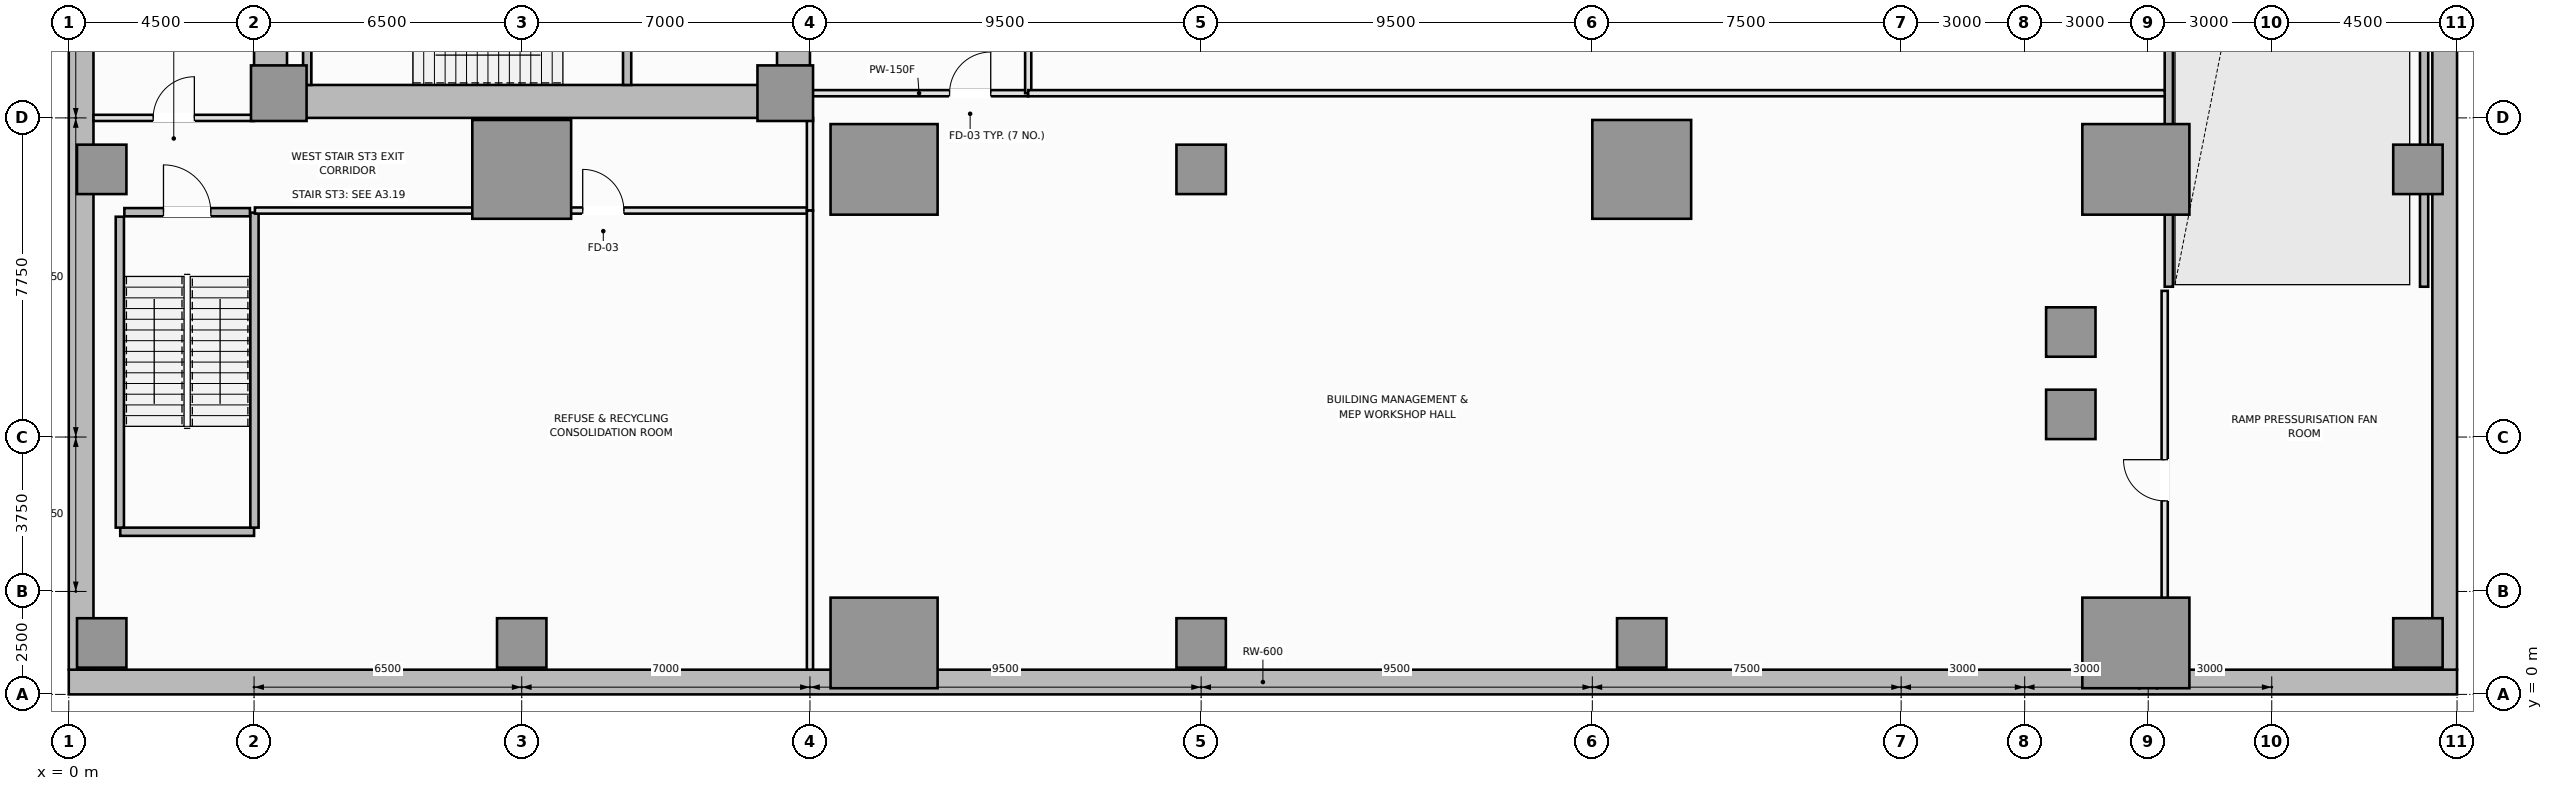
"""IFC4 building model, lengths in metres.
Left out: names, types, materials, properties, quantities, classifications, styles, units other than length and angle.
Written with IfcOpenShell. Run it as: python <this file> out.ifc"""

import sys

from ifc_helpers import new_model, si_unit, direction, frame, frame_2d, origin, origin_2d, place, context, subcontext, project, spatial, rectangle, extrude, element, fill, save


model = new_model("IFC4")
c1 = context("Model", 3, precision=1e-05, world=origin(), true_north=direction((0.0, 1.0)))
c2 = subcontext(c1, "Body", "Model", "MODEL_VIEW")
j1 = project(units=[si_unit("LENGTHUNIT", "METRE"), si_unit("PLANEANGLEUNIT", "RADIAN")], contexts=[c1])
p1 = place(None, origin())
s1 = spatial("IfcSite", under=j1, at=p1, CompositionType="ELEMENT")
p2 = place(p1, origin())
s2 = spatial("IfcBuilding", under=s1, at=p2, CompositionType="ELEMENT")
p3 = place(p2, frame((0.0, 0.0, -4.8)))
s3 = spatial("IfcBuildingStorey", under=s2, at=p3, CompositionType="ELEMENT", Elevation=-4.8)
p4 = place(p3, frame((0.0, 0.3, 0.0), z_axis=(0.0, 0.0, 1.0), x_axis=(1.0, 0.0, 0.0)))
e1 = element("IfcWall", 1, at=p4, inside=s3, PredefinedType="USERDEFINED", context=c2, shape_type="SweptSolid", body=[
    extrude(rectangle(XDim=58.0, YDim=0.6, at=frame_2d((29.0, 0.0))), origin(), (0.0, 0.0, 1.0), 4.8),
])
for number, where, z_axis, x_axis in (
    (2, (0.3, 0.6, 0.0), (0.0, 0.0, 1.0), (0.0, 1.0, 0.0)),
    (3, (57.7, 0.6, 0.0), (0.0, 0.0, 1.0), (0.0, 1.0, 0.0)),
):
    element("IfcWall", number, at=place(p3, frame(where, z_axis=z_axis, x_axis=x_axis)), inside=s3, PredefinedType="USERDEFINED", context=c2, shape_type="SweptSolid", body=[
        extrude(rectangle(XDim=49.3, YDim=0.6, at=frame_2d((24.65, 0.0))), origin(), (0.0, 0.0, 1.0), 4.8),
    ])
p5 = place(p3, frame((4.5, 14.4, 0.0), z_axis=(0.0, 0.0, 1.0), x_axis=(1.0, 0.0, 0.0)))
e4 = element("IfcWall", 4, at=p5, inside=s3, PredefinedType="SHEAR", context=c2, shape_type="SweptSolid", body=[
    extrude(rectangle(XDim=13.5, YDim=0.8, at=frame_2d((6.75, 0.0))), origin(), (0.0, 0.0, 1.0), 4.8),
])
p6 = place(p3, frame((4.9, 14.8, 0.0), z_axis=(0.0, 0.0, 1.0), x_axis=(0.0, 1.0, 0.0)))
e5 = element("IfcWall", 5, at=p6, inside=s3, PredefinedType="SHEAR", context=c2, shape_type="SweptSolid", body=[
    extrude(rectangle(XDim=20.9, YDim=0.8, at=frame_2d((10.45, 0.0))), origin(), (0.0, 0.0, 1.0), 4.8),
])
p7 = place(p3, frame((17.6, 14.8, 0.0), z_axis=(0.0, 0.0, 1.0), x_axis=(0.0, 1.0, 0.0)))
e6 = element("IfcWall", 6, at=p7, inside=s3, PredefinedType="SHEAR", context=c2, shape_type="SweptSolid", body=[
    extrude(rectangle(XDim=8.65, YDim=0.8, at=frame_2d((4.325, 0.0))), origin(), (0.0, 0.0, 1.0), 4.8),
])
p8 = place(p7, frame((4.1, 0.0, 0.0)))
e7 = element("IfcOpeningElement", 7, at=p8, cuts=e6, PredefinedType="OPENING", context=c2, shape_type="SweptSolid", body=[
    extrude(rectangle(XDim=1.1, YDim=2.15, at=frame_2d((0.55, 1.075))), frame((0.0, 0.41, 0.0), z_axis=(0.0, -1.0, 0.0), x_axis=(1.0, 0.0, 0.0)), (0.0, 0.0, 1.0), 0.82),
])
for number, where, z_axis, x_axis in (
    (8, (5.1, 14.6, 0.0), (0.0, 0.0, 1.0), (1.0, 0.0, 0.0)),
    (9, (17.4, 14.6, 0.0), (0.0, 0.0, 1.0), (1.0, 0.0, 0.0)),
):
    element("IfcColumn", number, at=place(p3, frame(where, z_axis=z_axis, x_axis=x_axis)), inside=s3, PredefinedType="PILASTER", context=c2, shape_type="SweptSolid", body=[
        extrude(rectangle(XDim=1.35, YDim=1.35, at=origin_2d()), origin(), (0.0, 0.0, 1.0), 4.8),
    ])
for number, where, z_axis, x_axis in (
    (10, (11.0, 12.75, 0.0), (0.0, 0.0, 1.0), (1.0, 0.0, 0.0)),
    (11, (38.2, 12.75, 0.0), (0.0, 0.0, 1.0), (1.0, 0.0, 0.0)),
):
    element("IfcColumn", number, at=place(p3, frame(where, z_axis=z_axis, x_axis=x_axis)), inside=s3, PredefinedType="COLUMN", context=c2, shape_type="SweptSolid", body=[
        extrude(rectangle(XDim=2.4, YDim=2.4, at=origin_2d()), origin(), (0.0, 0.0, 1.0), 4.8),
    ])
p9 = place(p3, frame((27.5, 12.75, 0.0), z_axis=(0.0, 0.0, 1.0), x_axis=(1.0, 0.0, 0.0)))
e12 = element("IfcColumn", 12, at=p9, inside=s3, PredefinedType="COLUMN", context=c2, shape_type="SweptSolid", body=[
    extrude(rectangle(XDim=1.2, YDim=1.2, at=origin_2d()), origin(), (0.0, 0.0, 1.0), 4.8),
])
for number, where, z_axis, x_axis in (
    (13, (19.8, 1.25, 0.0), (0.0, 0.0, 1.0), (1.0, 0.0, 0.0)),
    (14, (50.2, 1.25, 0.0), (0.0, 0.0, 1.0), (1.0, 0.0, 0.0)),
    (15, (19.8, 12.75, 0.0), (0.0, 0.0, 1.0), (1.0, 0.0, 0.0)),
    (16, (50.2, 12.75, 0.0), (0.0, 0.0, 1.0), (1.0, 0.0, 0.0)),
):
    element("IfcColumn", number, at=place(p3, frame(where, z_axis=z_axis, x_axis=x_axis)), inside=s3, PredefinedType="COLUMN", context=c2, shape_type="SweptSolid", body=[
        extrude(rectangle(XDim=2.6, YDim=2.2, at=origin_2d()), origin(), (0.0, 0.0, 1.0), 4.8),
    ])
for number, where, z_axis, x_axis in (
    (17, (0.8, 1.25, 0.0), (0.0, 0.0, 1.0), (1.0, 0.0, 0.0)),
    (18, (57.05, 1.25, 0.0), (0.0, 0.0, 1.0), (1.0, 0.0, 0.0)),
    (19, (0.8, 12.75, 0.0), (0.0, 0.0, 1.0), (1.0, 0.0, 0.0)),
    (20, (57.05, 12.75, 0.0), (0.0, 0.0, 1.0), (1.0, 0.0, 0.0)),
    (21, (11.0, 1.25, 0.0), (0.0, 0.0, 1.0), (1.0, 0.0, 0.0)),
    (22, (48.62, 6.8, 0.0), (0.0, 0.0, 1.0), (1.0, 0.0, 0.0)),
    (23, (48.62, 8.8, 0.0), (0.0, 0.0, 1.0), (1.0, 0.0, 0.0)),
    (24, (27.5, 1.25, 0.0), (0.0, 0.0, 1.0), (1.0, 0.0, 0.0)),
    (25, (38.2, 1.25, 0.0), (0.0, 0.0, 1.0), (1.0, 0.0, 0.0)),
):
    element("IfcColumn", number, at=place(p3, frame(where, z_axis=z_axis, x_axis=x_axis)), inside=s3, PredefinedType="COLUMN", context=c2, shape_type="SweptSolid", body=[
        extrude(rectangle(XDim=1.2, YDim=1.2, at=origin_2d()), origin(), (0.0, 0.0, 1.0), 4.8),
    ])
p10 = place(p3, frame((5.79, 14.8, 0.0), z_axis=(0.0, 0.0, 1.0), x_axis=(0.0, 1.0, 0.0)))
e26 = element("IfcWall", 26, at=p10, inside=s3, PredefinedType="SOLIDWALL", context=c2, shape_type="SweptSolid", body=[
    extrude(rectangle(XDim=3.05, YDim=0.2, at=frame_2d((1.525, 0.0))), origin(), (0.0, 0.0, 1.0), 4.8),
])
p11 = place(p3, frame((13.56, 14.8, 0.0), z_axis=(0.0, 0.0, 1.0), x_axis=(0.0, 1.0, 0.0)))
e27 = element("IfcWall", 27, at=p11, inside=s3, PredefinedType="SOLIDWALL", context=c2, shape_type="SweptSolid", body=[
    extrude(rectangle(XDim=3.05, YDim=0.2, at=frame_2d((1.525, 0.0))), origin(), (0.0, 0.0, 1.0), 4.8),
])
p12 = place(p11, frame((0.95, 0.0, 0.0)))
e28 = element("IfcOpeningElement", 28, at=p12, cuts=e27, PredefinedType="OPENING", context=c2, shape_type="SweptSolid", body=[
    extrude(rectangle(XDim=1.15, YDim=2.15, at=frame_2d((0.575, 1.075))), frame((0.0, 0.11, 0.0), z_axis=(0.0, -1.0, 0.0), x_axis=(1.0, 0.0, 0.0)), (0.0, 0.0, 1.0), 0.22),
])
p13 = place(p3, frame((1.25, 3.95, 0.0), z_axis=(0.0, 0.0, 1.0), x_axis=(1.0, 0.0, 0.0)))
e29 = element("IfcWall", 29, at=p13, inside=s3, PredefinedType="SOLIDWALL", context=c2, shape_type="SweptSolid", body=[
    extrude(rectangle(XDim=3.25, YDim=0.2, at=frame_2d((1.625, 0.0))), origin(), (0.0, 0.0, 1.0), 4.8),
])
p14 = place(p3, frame((1.24, 4.05, 0.0), z_axis=(0.0, 0.0, 1.0), x_axis=(0.0, 1.0, 0.0)))
e30 = element("IfcWall", 30, at=p14, inside=s3, PredefinedType="SOLIDWALL", context=c2, shape_type="SweptSolid", body=[
    extrude(rectangle(XDim=7.55, YDim=0.2, at=frame_2d((3.775, 0.0))), origin(), (0.0, 0.0, 1.0), 4.8),
])
p15 = place(p3, frame((4.51, 4.05, 0.0), z_axis=(0.0, 0.0, 1.0), x_axis=(0.0, 1.0, 0.0)))
e31 = element("IfcWall", 31, at=p15, inside=s3, PredefinedType="SOLIDWALL", context=c2, shape_type="SweptSolid", body=[
    extrude(rectangle(XDim=7.65, YDim=0.2, at=frame_2d((3.825, 0.0))), origin(), (0.0, 0.0, 1.0), 4.8),
])
p16 = place(p3, frame((1.35, 11.71, 0.0), z_axis=(0.0, 0.0, 1.0), x_axis=(1.0, 0.0, 0.0)))
e32 = element("IfcWall", 32, at=p16, inside=s3, PredefinedType="SOLIDWALL", context=c2, shape_type="SweptSolid", body=[
    extrude(rectangle(XDim=3.05, YDim=0.2, at=frame_2d((1.525, 0.0))), origin(), (0.0, 0.0, 1.0), 4.8),
])
p17 = place(p16, frame((0.95, 0.0, 0.0)))
e33 = element("IfcOpeningElement", 33, at=p17, cuts=e32, PredefinedType="OPENING", context=c2, shape_type="SweptSolid", body=[
    extrude(rectangle(XDim=1.15, YDim=2.15, at=frame_2d((0.575, 1.075))), frame((0.0, 0.11, 0.0), z_axis=(0.0, -1.0, 0.0), x_axis=(1.0, 0.0, 0.0)), (0.0, 0.0, 1.0), 0.22),
])
for number, where, z_axis, x_axis in (
    (34, (51.0, 9.9, 0.0), (0.0, 0.0, 1.0), (0.0, 1.0, 0.0)),
    (35, (57.2, 9.9, 0.0), (0.0, 0.0, 1.0), (0.0, 1.0, 0.0)),
):
    element("IfcWall", number, at=place(p3, frame(where, z_axis=z_axis, x_axis=x_axis)), inside=s3, PredefinedType="SOLIDWALL", context=c2, shape_type="SweptSolid", body=[
        extrude(rectangle(XDim=29.0, YDim=0.2, at=frame_2d((14.5, 0.0))), origin(), (0.0, 0.0, 1.0), 4.8),
    ])
p18 = place(p3, frame((18.0, 14.6, 0.0), z_axis=(0.0, 0.0, 1.0), x_axis=(1.0, 0.0, 0.0)))
e36 = element("IfcWall", 36, at=p18, inside=s3, PredefinedType="PARTITIONING", context=c2, shape_type="SweptSolid", body=[
    extrude(rectangle(XDim=5.3, YDim=0.15, at=frame_2d((2.65, 0.0))), origin(), (0.0, 0.0, 1.0), 4.6),
])
p19 = place(p18, frame((3.39, 0.0, 0.0)))
e37 = element("IfcOpeningElement", 37, at=p19, cuts=e36, PredefinedType="OPENING", context=c2, shape_type="SweptSolid", body=[
    extrude(rectangle(XDim=1.0, YDim=2.15, at=frame_2d((0.5, 1.075))), frame((0.0, 0.085, 0.0), z_axis=(0.0, -1.0, 0.0), x_axis=(1.0, 0.0, 0.0)), (0.0, 0.0, 1.0), 0.17),
])
p20 = place(p3, frame((23.3, 14.6, 0.0), z_axis=(0.0, 0.0, 1.0), x_axis=(0.0, 1.0, 0.0)))
e38 = element("IfcWall", 38, at=p20, inside=s3, PredefinedType="PARTITIONING", context=c2, shape_type="SweptSolid", body=[
    extrude(rectangle(XDim=21.3, YDim=0.15, at=frame_2d((10.65, 0.0))), origin(), (0.0, 0.0, 1.0), 4.6),
])
p21 = place(p20, frame((9.75, 0.0, 0.0)))
e39 = element("IfcOpeningElement", 39, at=p21, cuts=e38, PredefinedType="OPENING", context=c2, shape_type="SweptSolid", body=[
    extrude(rectangle(XDim=1.8, YDim=2.2, at=frame_2d((0.9, 1.1))), frame((0.0, 0.085, 0.0), z_axis=(0.0, -1.0, 0.0), x_axis=(1.0, 0.0, 0.0)), (0.0, 0.0, 1.0), 0.17),
])
p22 = place(p3, frame((4.52, 11.75, 0.0), z_axis=(0.0, 0.0, 1.0), x_axis=(1.0, 0.0, 0.0)))
e40 = element("IfcWall", 40, at=p22, inside=s3, PredefinedType="PARTITIONING", context=c2, shape_type="SweptSolid", body=[
    extrude(rectangle(XDim=13.48, YDim=0.15, at=frame_2d((6.74, 0.0))), origin(), (0.0, 0.0, 1.0), 4.6),
])
p23 = place(p22, frame((7.961, 0.0, 0.0)))
e41 = element("IfcOpeningElement", 41, at=p23, cuts=e40, PredefinedType="OPENING", context=c2, shape_type="SweptSolid", body=[
    extrude(rectangle(XDim=1.0, YDim=2.15, at=frame_2d((0.5, 1.075))), frame((0.0, 0.085, 0.0), z_axis=(0.0, -1.0, 0.0), x_axis=(1.0, 0.0, 0.0)), (0.0, 0.0, 1.0), 0.17),
])
p24 = place(p3, frame((0.6, 14.0, 0.0), z_axis=(0.0, 0.0, 1.0), x_axis=(1.0, 0.0, 0.0)))
e42 = element("IfcWall", 42, at=p24, inside=s3, PredefinedType="PARTITIONING", context=c2, shape_type="SweptSolid", body=[
    extrude(rectangle(XDim=3.9, YDim=0.15, at=frame_2d((1.95, 0.0))), origin(), (0.0, 0.0, 1.0), 4.6),
])
p25 = place(p24, frame((1.45, 0.0, 0.0)))
e43 = element("IfcOpeningElement", 43, at=p25, cuts=e42, PredefinedType="OPENING", context=c2, shape_type="SweptSolid", body=[
    extrude(rectangle(XDim=1.0, YDim=2.15, at=frame_2d((0.5, 1.075))), frame((0.0, 0.085, 0.0), z_axis=(0.0, -1.0, 0.0), x_axis=(1.0, 0.0, 0.0)), (0.0, 0.0, 1.0), 0.17),
])
p26 = place(p3, frame((18.0, 11.75, 0.0), z_axis=(0.0, 0.0, 1.0), x_axis=(0.0, 1.0, 0.0)))
e44 = element("IfcWall", 44, at=p26, inside=s3, PredefinedType="PARTITIONING", context=c2, shape_type="SweptSolid", body=[
    extrude(rectangle(XDim=2.25, YDim=0.15, at=frame_2d((1.125, 0.0))), origin(), (0.0, 0.0, 1.0), 4.6),
])
p27 = place(p3, frame((18.0, 0.6, 0.0), z_axis=(0.0, 0.0, 1.0), x_axis=(0.0, 1.0, 0.0)))
e45 = element("IfcWall", 45, at=p27, inside=s3, PredefinedType="PARTITIONING", context=c2, shape_type="SweptSolid", body=[
    extrude(rectangle(XDim=11.15, YDim=0.15, at=frame_2d((5.575, 0.0))), origin(), (0.0, 0.0, 1.0), 4.6),
])
p28 = place(p3, frame((23.3, 14.6, 0.0), z_axis=(0.0, 0.0, 1.0), x_axis=(1.0, 0.0, 0.0)))
e46 = element("IfcWall", 46, at=p28, inside=s3, PredefinedType="PARTITIONING", context=c2, shape_type="SweptSolid", body=[
    extrude(rectangle(XDim=27.6, YDim=0.15, at=frame_2d((13.8, 0.0))), origin(), (0.0, 0.0, 1.0), 4.6),
])
p29 = place(p3, frame((50.9, 0.6, 0.0), z_axis=(0.0, 0.0, 1.0), x_axis=(0.0, 1.0, 0.0)))
e47 = element("IfcWall", 47, at=p29, inside=s3, PredefinedType="PARTITIONING", context=c2, shape_type="SweptSolid", body=[
    extrude(rectangle(XDim=9.2, YDim=0.15, at=frame_2d((4.6, 0.0))), origin(), (0.0, 0.0, 1.0), 4.6),
])
p30 = place(p29, frame((4.1, 0.0, 0.0)))
e48 = element("IfcOpeningElement", 48, at=p30, cuts=e47, PredefinedType="OPENING", context=c2, shape_type="SweptSolid", body=[
    extrude(rectangle(XDim=1.0, YDim=2.15, at=frame_2d((0.5, 1.075))), frame((0.0, 0.085, 0.0), z_axis=(0.0, -1.0, 0.0), x_axis=(1.0, 0.0, 0.0)), (0.0, 0.0, 1.0), 0.17),
])
p31 = place(p17, origin())
e49 = element("IfcDoor", 49, at=p31, inside=s3, OperationType="SINGLE_SWING_LEFT", PredefinedType="DOOR", context=c2, shape_type="SweptSolid", body=[
    extrude(rectangle(XDim=1.15, YDim=2.15, at=frame_2d((0.575, 1.075))), frame((0.0, 0.025, 0.0), z_axis=(0.0, -1.0, 0.0), x_axis=(1.0, 0.0, 0.0)), (0.0, 0.0, 1.0), 0.05),
])
fill(e33, e49)
p32 = place(p19, origin())
e50 = element("IfcDoor", 50, at=p32, inside=s3, OperationType="SINGLE_SWING_RIGHT", PredefinedType="DOOR", context=c2, shape_type="SweptSolid", body=[
    extrude(rectangle(XDim=1.0, YDim=2.15, at=frame_2d((0.5, 1.075))), frame((0.0, 0.025, 0.0), z_axis=(0.0, -1.0, 0.0), x_axis=(1.0, 0.0, 0.0)), (0.0, 0.0, 1.0), 0.05),
])
fill(e37, e50)
p33 = place(p23, origin())
e51 = element("IfcDoor", 51, at=p33, inside=s3, OperationType="SINGLE_SWING_LEFT", PredefinedType="DOOR", context=c2, shape_type="SweptSolid", body=[
    extrude(rectangle(XDim=1.0, YDim=2.15, at=frame_2d((0.5, 1.075))), frame((0.0, 0.025, 0.0), z_axis=(0.0, -1.0, 0.0), x_axis=(1.0, 0.0, 0.0)), (0.0, 0.0, 1.0), 0.05),
])
fill(e41, e51)
p34 = place(p25, origin())
e52 = element("IfcDoor", 52, at=p34, inside=s3, OperationType="SINGLE_SWING_RIGHT", PredefinedType="DOOR", context=c2, shape_type="SweptSolid", body=[
    extrude(rectangle(XDim=1.0, YDim=2.15, at=frame_2d((0.5, 1.075))), frame((0.0, 0.025, 0.0), z_axis=(0.0, -1.0, 0.0), x_axis=(1.0, 0.0, 0.0)), (0.0, 0.0, 1.0), 0.05),
])
fill(e43, e52)
p35 = place(p30, origin())
e53 = element("IfcDoor", 53, at=p35, inside=s3, OperationType="SINGLE_SWING_RIGHT", PredefinedType="DOOR", context=c2, shape_type="SweptSolid", body=[
    extrude(rectangle(XDim=1.0, YDim=2.15, at=frame_2d((0.5, 1.075))), frame((0.0, 0.025, 0.0), z_axis=(0.0, -1.0, 0.0), x_axis=(1.0, 0.0, 0.0)), (0.0, 0.0, 1.0), 0.05),
])
fill(e48, e53)
save(model, sys.argv[1])
